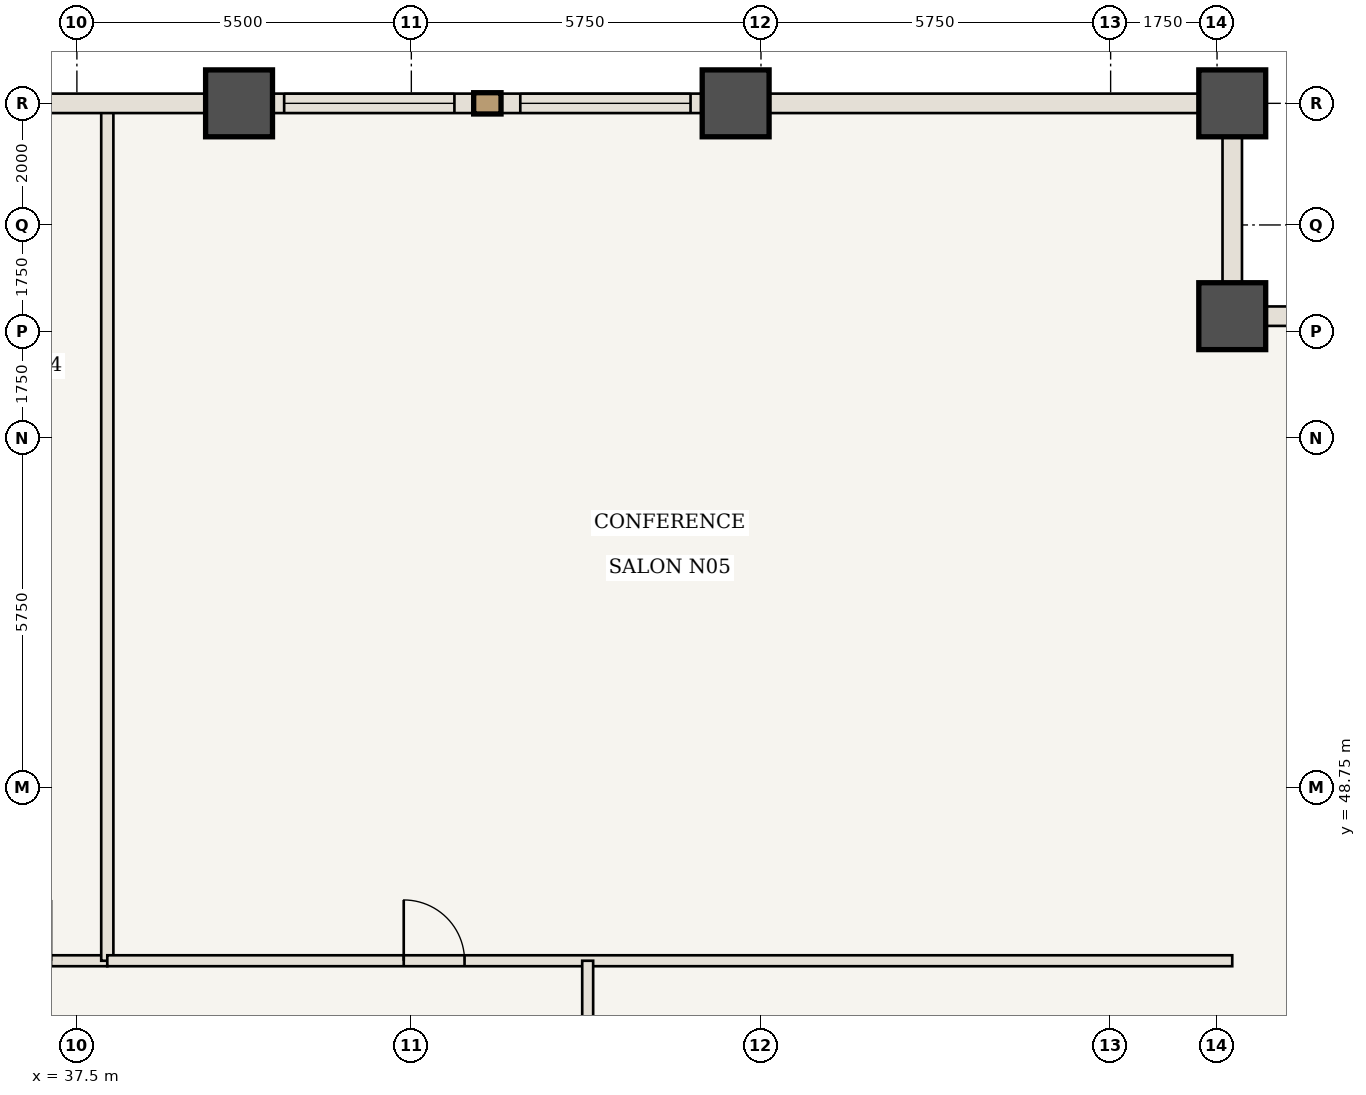
"""IFC4 building model, lengths in metres.
Left out: names, types, materials, properties, quantities, classifications, styles, units other than length and angle.
Written with IfcOpenShell. Run it as: python <this file> out.ifc"""

import sys

from ifc_helpers import new_model, si_unit, direction, frame, frame_2d, origin, origin_2d, place, context, subcontext, project, spatial, rectangle, extrude, element, fill, save


model = new_model("IFC4")
c1 = context("Model", 3, precision=1e-05, world=origin(), true_north=direction((0.0, 1.0)))
c2 = subcontext(c1, "Body", "Model", "MODEL_VIEW")
j1 = project(units=[si_unit("LENGTHUNIT", "METRE"), si_unit("PLANEANGLEUNIT", "RADIAN")], contexts=[c1])
p1 = place(None, origin())
s1 = spatial("IfcSite", under=j1, at=p1, CompositionType="ELEMENT")
p2 = place(p1, origin())
s2 = spatial("IfcBuilding", under=s1, at=p2, CompositionType="ELEMENT")
p3 = place(p2, frame((0.0, 0.0, 56.35)))
s3 = spatial("IfcBuildingStorey", under=s2, at=p3, CompositionType="ELEMENT", Elevation=56.35)
for number, where, z_axis, x_axis in (
    (1, (56.5, 56.5, 0.0), (0.0, 0.0, 1.0), (1.0, 0.0, 0.0)),
    (2, (56.5, 60.0, 0.0), (0.0, 0.0, 1.0), (1.0, 0.0, 0.0)),
    (3, (40.167, 60.0, 0.0), (0.0, 0.0, 1.0), (1.0, 0.0, 0.0)),
    (4, (48.333, 60.0, 0.0), (0.0, 0.0, 1.0), (1.0, 0.0, 0.0)),
):
    element("IfcColumn", number, at=place(p3, frame(where, z_axis=z_axis, x_axis=x_axis)), inside=s3, PredefinedType="COLUMN", context=c2, shape_type="SweptSolid", body=[
        extrude(rectangle(XDim=1.1, YDim=1.1, at=origin_2d()), origin(), (0.0, 0.0, 1.0), 3.5),
    ])
p4 = place(p3, frame((33.3, 45.9, 0.0), z_axis=(0.0, 0.0, 1.0), x_axis=(1.0, 0.0, 0.0)))
e5 = element("IfcWall", 5, at=p4, inside=s3, PredefinedType="STANDARD", context=c2, shape_type="SweptSolid", body=[
    extrude(rectangle(XDim=4.7, YDim=0.18, at=frame_2d((2.35, 0.0))), origin(), (0.0, 0.0, 1.0), 3.32),
])
p5 = place(p4, frame((2.775, 0.0, 0.0)))
e6 = element("IfcOpeningElement", 6, at=p5, cuts=e5, PredefinedType="OPENING", context=c2, shape_type="SweptSolid", body=[
    extrude(rectangle(XDim=1.0, YDim=2.15, at=frame_2d((0.5, 1.075))), frame((0.0, 0.1, 0.0), z_axis=(0.0, -1.0, 0.0), x_axis=(1.0, 0.0, 0.0)), (0.0, 0.0, 1.0), 0.2),
])
p6 = place(p3, frame((38.0, 45.9, 0.0), z_axis=(0.0, 0.0, 1.0), x_axis=(0.0, 1.0, 0.0)))
e7 = element("IfcWall", 7, at=p6, inside=s3, PredefinedType="STANDARD", context=c2, shape_type="SweptSolid", body=[
    extrude(rectangle(XDim=14.04, YDim=0.2, at=frame_2d((7.02, 0.0))), origin(), (0.0, 0.0, 1.0), 3.32),
])
p7 = place(p3, frame((38.0, 45.9, 0.0), z_axis=(0.0, 0.0, 1.0), x_axis=(1.0, 0.0, 0.0)))
e8 = element("IfcWall", 8, at=p7, inside=s3, PredefinedType="STANDARD", context=c2, shape_type="SweptSolid", body=[
    extrude(rectangle(XDim=18.5, YDim=0.18, at=frame_2d((9.25, 0.0))), origin(), (0.0, 0.0, 1.0), 3.32),
])
p8 = place(p7, frame((4.875, 0.0, 0.0)))
e9 = element("IfcOpeningElement", 9, at=p8, cuts=e8, PredefinedType="OPENING", context=c2, shape_type="SweptSolid", body=[
    extrude(rectangle(XDim=1.0, YDim=2.15, at=frame_2d((0.5, 1.075))), frame((0.0, 0.1, 0.0), z_axis=(0.0, -1.0, 0.0), x_axis=(1.0, 0.0, 0.0)), (0.0, 0.0, 1.0), 0.2),
])
p9 = place(p3, frame((45.9, 37.6, 0.0), z_axis=(0.0, 0.0, 1.0), x_axis=(0.0, 1.0, 0.0)))
e10 = element("IfcWall", 10, at=p9, inside=s3, PredefinedType="STANDARD", context=c2, shape_type="SweptSolid", body=[
    extrude(rectangle(XDim=8.3, YDim=0.18, at=frame_2d((4.15, 0.0))), origin(), (0.0, 0.0, 1.0), 3.32),
])
p10 = place(p9, frame((3.65, 0.0, 0.0)))
e11 = element("IfcOpeningElement", 11, at=p10, cuts=e10, PredefinedType="OPENING", context=c2, shape_type="SweptSolid", body=[
    extrude(rectangle(XDim=1.0, YDim=2.15, at=frame_2d((0.5, 1.075))), frame((0.0, 0.1, 0.0), z_axis=(0.0, -1.0, 0.0), x_axis=(1.0, 0.0, 0.0)), (0.0, 0.0, 1.0), 0.2),
])
p11 = place(p3, frame((32.0, 60.0, 0.0), z_axis=(0.0, 0.0, 1.0), x_axis=(1.0, 0.0, 0.0)))
e12 = element("IfcWall", 12, at=p11, inside=s3, PredefinedType="USERDEFINED", context=c2, shape_type="SweptSolid", body=[
    extrude(rectangle(XDim=8.167, YDim=0.32, at=frame_2d((4.083, 0.0))), origin(), (0.0, 0.0, 1.0), 2.52),
])
p12 = place(p11, frame((2.45, 0.0, 0.85)))
e13 = element("IfcOpeningElement", 13, at=p12, cuts=e12, PredefinedType="OPENING", context=c2, shape_type="SweptSolid", body=[
    extrude(rectangle(XDim=2.4, YDim=1.47, at=frame_2d((1.2, 0.735))), frame((0.0, 0.17, 0.0), z_axis=(0.0, -1.0, 0.0), x_axis=(1.0, 0.0, 0.0)), (0.0, 0.0, 1.0), 0.34),
])
p13 = place(p3, frame((40.167, 60.0, 0.0), z_axis=(0.0, 0.0, 1.0), x_axis=(1.0, 0.0, 0.0)))
e14 = element("IfcWall", 14, at=p13, inside=s3, PredefinedType="USERDEFINED", context=c2, shape_type="SweptSolid", body=[
    extrude(rectangle(XDim=8.167, YDim=0.32, at=frame_2d((4.083, 0.0))), origin(), (0.0, 0.0, 1.0), 2.52),
])
p14 = place(p13, frame((0.742, 0.0, 0.85)))
e15 = element("IfcOpeningElement", 15, at=p14, cuts=e14, PredefinedType="OPENING", context=c2, shape_type="SweptSolid", body=[
    extrude(rectangle(XDim=2.8, YDim=1.47, at=frame_2d((1.4, 0.735))), frame((0.0, 0.17, 0.0), z_axis=(0.0, -1.0, 0.0), x_axis=(1.0, 0.0, 0.0)), (0.0, 0.0, 1.0), 0.34),
])
p15 = place(p13, frame((4.625, 0.0, 0.85)))
e16 = element("IfcOpeningElement", 16, at=p15, cuts=e14, PredefinedType="OPENING", context=c2, shape_type="SweptSolid", body=[
    extrude(rectangle(XDim=2.8, YDim=1.47, at=frame_2d((1.4, 0.735))), frame((0.0, 0.17, 0.0), z_axis=(0.0, -1.0, 0.0), x_axis=(1.0, 0.0, 0.0)), (0.0, 0.0, 1.0), 0.34),
])
p16 = place(p3, frame((48.333, 60.0, 0.0), z_axis=(0.0, 0.0, 1.0), x_axis=(1.0, 0.0, 0.0)))
e17 = element("IfcWall", 17, at=p16, inside=s3, PredefinedType="USERDEFINED", context=c2, shape_type="SweptSolid", body=[
    extrude(rectangle(XDim=8.167, YDim=0.32, at=frame_2d((4.083, 0.0))), origin(), (0.0, 0.0, 1.0), 2.52),
])
for number, where, z_axis, x_axis in (
    (18, (56.5, 56.5, 0.0), (0.0, 0.0, 1.0), (1.0, 0.0, 0.0)),
    (19, (56.5, 60.0, 0.0), (0.0, 0.0, 1.0), (0.0, -1.0, 0.0)),
):
    element("IfcWall", number, at=place(p3, frame(where, z_axis=z_axis, x_axis=x_axis)), inside=s3, PredefinedType="USERDEFINED", context=c2, shape_type="SweptSolid", body=[
        extrude(rectangle(XDim=3.5, YDim=0.32, at=frame_2d((1.75, 0.0))), origin(), (0.0, 0.0, 1.0), 2.52),
    ])
p17 = place(p8, origin())
e20 = element("IfcDoor", 20, at=p17, inside=s3, OperationType="SINGLE_SWING_LEFT", PredefinedType="DOOR", context=c2, shape_type="SweptSolid", body=[
    extrude(rectangle(XDim=1.0, YDim=2.15, at=frame_2d((0.5, 1.075))), frame((0.0, 0.025, 0.0), z_axis=(0.0, -1.0, 0.0), x_axis=(1.0, 0.0, 0.0)), (0.0, 0.0, 1.0), 0.05),
])
fill(e9, e20)
p18 = place(p14, origin())
e21 = element("IfcWindow", 21, at=p18, inside=s3, PartitioningType="SINGLE_PANEL", PredefinedType="WINDOW", context=c2, shape_type="SweptSolid", body=[
    extrude(rectangle(XDim=2.8, YDim=1.47, at=frame_2d((1.4, 0.735))), frame((0.0, 0.03, 0.0), z_axis=(0.0, -1.0, 0.0), x_axis=(1.0, 0.0, 0.0)), (0.0, 0.0, 1.0), 0.06),
])
fill(e15, e21)
p19 = place(p15, origin())
e22 = element("IfcWindow", 22, at=p19, inside=s3, PartitioningType="SINGLE_PANEL", PredefinedType="WINDOW", context=c2, shape_type="SweptSolid", body=[
    extrude(rectangle(XDim=2.8, YDim=1.47, at=frame_2d((1.4, 0.735))), frame((0.0, 0.03, 0.0), z_axis=(0.0, -1.0, 0.0), x_axis=(1.0, 0.0, 0.0)), (0.0, 0.0, 1.0), 0.06),
])
fill(e16, e22)
save(model, sys.argv[1])
